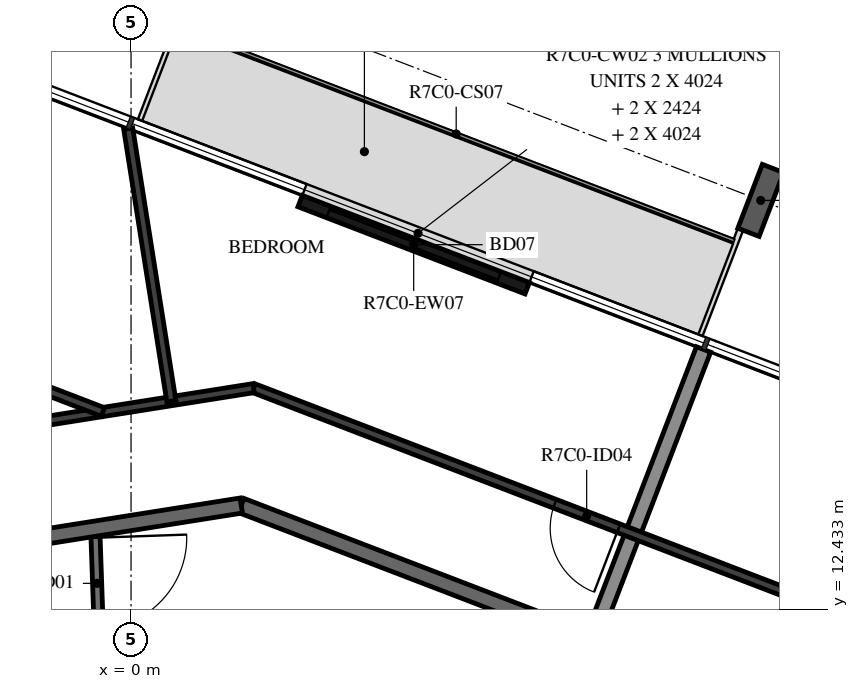
"""IFC4 building model, lengths in metres.
Left out: names, types, materials, properties, quantities, classifications, styles, units other than length and angle.
Written with IfcOpenShell. Run it as: python <this file> out.ifc"""

import sys

from ifc_helpers import new_model, si_unit, direction, frame, frame_2d, origin, origin_2d, place, context, subcontext, project, spatial, rectangle, i_section, extrude, element, fill, save


model = new_model("IFC4")
c1 = context("Model", 3, precision=1e-05, world=origin(), true_north=direction((0.0, 1.0)))
c2 = subcontext(c1, "Body", "Model", "MODEL_VIEW")
j1 = project(units=[si_unit("LENGTHUNIT", "METRE"), si_unit("PLANEANGLEUNIT", "RADIAN")], contexts=[c1])
p1 = place(None, origin())
s1 = spatial("IfcSite", under=j1, at=p1, CompositionType="ELEMENT")
p2 = place(p1, origin())
s2 = spatial("IfcBuilding", under=s1, at=p2, CompositionType="ELEMENT")
p3 = place(p2, frame((0.0, 0.0, 284.4)))
s3 = spatial("IfcBuildingStorey", under=s2, at=p3, CompositionType="ELEMENT", Elevation=284.4)
p4 = place(p3, frame((8.284, 17.811, -0.38), z_axis=(0.0, 0.0, 1.0), x_axis=(0.933580354843, -0.35836813621, 0.0)))
e1 = element("IfcColumn", 1, at=p4, inside=s3, PredefinedType="COLUMN", context=c2, shape_type="SweptSolid", body=[
    extrude(i_section(OverallWidth=0.3, OverallDepth=0.9, WebThickness=0.019, FlangeThickness=0.035, FilletRadius=0.03, at=origin_2d()), origin(), (0.0, 0.0, 1.0), 3.5),
])
p5 = place(p3, frame((5.212, 16.655, 0.0), z_axis=(0.0, 0.0, 1.0), x_axis=(-0.933579413923, 0.358370587381, 0.0)))
e2 = element("IfcWall", 2, at=p5, inside=s3, PredefinedType="STANDARD", context=c2, shape_type="SweptSolid", body=[
    extrude(rectangle(XDim=3.2, YDim=0.16, at=frame_2d((1.6, 0.0))), origin(), (0.0, 0.0, 1.0), 3.12),
])
p6 = place(p5, frame((0.4, 0.0, 0.0)))
e3 = element("IfcOpeningElement", 3, at=p6, cuts=e2, PredefinedType="OPENING", context=c2, shape_type="SweptSolid", body=[
    extrude(rectangle(XDim=2.4, YDim=2.4, at=frame_2d((1.2, 1.2))), frame((0.0, 0.09, 0.0), z_axis=(0.0, -1.0, 0.0), x_axis=(1.0, 0.0, 0.0)), (0.0, 0.0, 1.0), 0.18),
])
p7 = place(p3, frame((-0.471, 13.492, 0.0), z_axis=(0.0, 0.0, 1.0), x_axis=(0.034873173869, -0.999391745886, 0.0)))
e4 = element("IfcWall", 4, at=p7, inside=s3, PredefinedType="PARTITIONING", context=c2, shape_type="SweptSolid", body=[
    extrude(rectangle(XDim=1.596, YDim=0.12, at=frame_2d((0.798, 0.0))), origin(), (0.0, 0.0, 1.0), 3.12),
])
p8 = place(p7, frame((0.12, 0.0, 0.0)))
e5 = element("IfcOpeningElement", 5, at=p8, cuts=e4, PredefinedType="OPENING", context=c2, shape_type="SweptSolid", body=[
    extrude(rectangle(XDim=1.2, YDim=2.1, at=frame_2d((0.6, 1.05))), frame((0.0, 0.07, 0.0), z_axis=(0.0, -1.0, 0.0), x_axis=(1.0, 0.0, 0.0)), (0.0, 0.0, 1.0), 0.14),
])
p9 = place(p3, frame((8.154, 11.223, 0.0), z_axis=(0.0, 0.0, 1.0), x_axis=(-0.93359073609, 0.358341090983, 0.0)))
e6 = element("IfcWall", 6, at=p9, inside=s3, PredefinedType="STANDARD", context=c2, shape_type="SweptSolid", body=[
    extrude(rectangle(XDim=7.181, YDim=0.2, at=frame_2d((3.59, 0.0))), origin(), (0.0, 0.0, 1.0), 3.12),
])
p10 = place(p3, frame((1.45, 13.797, 0.0), z_axis=(0.0, 0.0, 1.0), x_axis=(-0.987690361611, -0.156421704315, 0.0)))
e7 = element("IfcWall", 7, at=p10, inside=s3, PredefinedType="STANDARD", context=c2, shape_type="SweptSolid", body=[
    extrude(rectangle(XDim=7.181, YDim=0.2, at=frame_2d((3.591, 0.0))), origin(), (0.0, 0.0, 1.0), 3.12),
])
p11 = place(p3, frame((7.532, 15.85, 0.0), z_axis=(0.0, 0.0, 1.0), x_axis=(-0.358355996975, -0.933585014571, 0.0)))
e8 = element("IfcWall", 8, at=p11, inside=s3, PredefinedType="STANDARD", context=c2, shape_type="SweptSolid", body=[
    extrude(rectangle(XDim=4.096, YDim=0.2, at=frame_2d((2.048, 0.0))), origin(), (0.0, 0.0, 1.0), 2.73),
])
p12 = place(p3, frame((9.067, 12.479, 0.0), z_axis=(0.0, 0.0, 1.0), x_axis=(-0.933579449035, 0.358370495911, 0.0)))
e9 = element("IfcWall", 9, at=p12, inside=s3, PredefinedType="PARTITIONING", context=c2, shape_type="SweptSolid", body=[
    extrude(rectangle(XDim=7.985, YDim=0.12, at=frame_2d((3.992, 0.0))), origin(), (0.0, 0.0, 1.0), 3.12),
])
p13 = place(p12, frame((2.841, 0.0, 0.0)))
e10 = element("IfcOpeningElement", 10, at=p13, cuts=e9, PredefinedType="OPENING", context=c2, shape_type="SweptSolid", body=[
    extrude(rectangle(XDim=0.9, YDim=2.1, at=frame_2d((0.45, 1.05))), frame((0.0, 0.07, 0.0), z_axis=(0.0, -1.0, 0.0), x_axis=(1.0, 0.0, 0.0)), (0.0, 0.0, 1.0), 0.14),
])
p14 = place(p3, frame((1.612, 15.341, 0.0), z_axis=(0.0, 0.0, 1.0), x_axis=(-0.987690790621, -0.156418995404, 0.0)))
e11 = element("IfcWall", 11, at=p14, inside=s3, PredefinedType="PARTITIONING", context=c2, shape_type="SweptSolid", body=[
    extrude(rectangle(XDim=7.581, YDim=0.12, at=frame_2d((3.791, 0.0))), origin(), (0.0, 0.0, 1.0), 3.12),
])
p15 = place(p14, frame((3.507, 0.0, 0.0)))
e12 = element("IfcOpeningElement", 12, at=p15, cuts=e11, PredefinedType="OPENING", context=c2, shape_type="SweptSolid", body=[
    extrude(rectangle(XDim=0.8, YDim=2.1, at=frame_2d((0.4, 1.05))), frame((0.0, 0.07, 0.0), z_axis=(0.0, -1.0, 0.0), x_axis=(1.0, 0.0, 0.0)), (0.0, 0.0, 1.0), 0.14),
])
p16 = place(p3, frame((-0.037, 18.756, 0.0), z_axis=(0.0, 0.0, 1.0), x_axis=(0.156421851095, -0.987690338365, 0.0)))
e13 = element("IfcWall", 13, at=p16, inside=s3, PredefinedType="PARTITIONING", context=c2, shape_type="SweptSolid", body=[
    extrude(rectangle(XDim=3.63, YDim=0.12, at=frame_2d((1.815, 0.0))), origin(), (0.0, 0.0, 1.0), 3.12),
])
p17 = place(p3, frame((-10.18, 18.793, 0.0), z_axis=(0.0, 0.0, 1.0), x_axis=(0.933574148929, -0.358384302742, 0.0)))
e14 = element("IfcWall", 14, at=p17, inside=s3, PredefinedType="PARTITIONING", context=c2, shape_type="SweptSolid", body=[
    extrude(rectangle(XDim=10.509, YDim=0.12, at=frame_2d((5.254, 0.0))), origin(), (0.0, 0.0, 1.0), 3.12),
])
p18 = place(p17, frame((2.829, 0.0, 0.0)))
e15 = element("IfcOpeningElement", 15, at=p18, cuts=e14, PredefinedType="OPENING", context=c2, shape_type="SweptSolid", body=[
    extrude(rectangle(XDim=0.9, YDim=2.1, at=frame_2d((0.45, 1.05))), frame((0.0, 0.07, 0.0), z_axis=(0.0, -1.0, 0.0), x_axis=(1.0, 0.0, 0.0)), (0.0, 0.0, 1.0), 0.14),
])
p19 = place(p6, origin())
e16 = element("IfcDoor", 16, at=p19, inside=s3, OperationType="DOUBLE_DOOR_SLIDING", PredefinedType="DOOR", context=c2, shape_type="SweptSolid", body=[
    extrude(rectangle(XDim=2.4, YDim=2.4, at=frame_2d((1.2, 1.2))), frame((0.0, 0.025, 0.0), z_axis=(0.0, -1.0, 0.0), x_axis=(1.0, 0.0, 0.0)), (0.0, 0.0, 1.0), 0.05),
])
fill(e3, e16)
p20 = place(p13, origin())
e17 = element("IfcDoor", 17, at=p20, inside=s3, OperationType="SINGLE_SWING_LEFT", PredefinedType="DOOR", context=c2, shape_type="SweptSolid", body=[
    extrude(rectangle(XDim=0.9, YDim=2.1, at=frame_2d((0.45, 1.05))), frame((0.0, 0.025, 0.0), z_axis=(0.0, -1.0, 0.0), x_axis=(1.0, 0.0, 0.0)), (0.0, 0.0, 1.0), 0.05),
])
fill(e10, e17)
p21 = place(p8, origin())
e18 = element("IfcDoor", 18, at=p21, inside=s3, OperationType="DOUBLE_DOOR_SINGLE_SWING", PredefinedType="DOOR", context=c2, shape_type="SweptSolid", body=[
    extrude(rectangle(XDim=1.2, YDim=2.1, at=frame_2d((0.6, 1.05))), frame((0.0, 0.025, 0.0), z_axis=(0.0, -1.0, 0.0), x_axis=(1.0, 0.0, 0.0)), (0.0, 0.0, 1.0), 0.05),
])
fill(e5, e18)
save(model, sys.argv[1])
